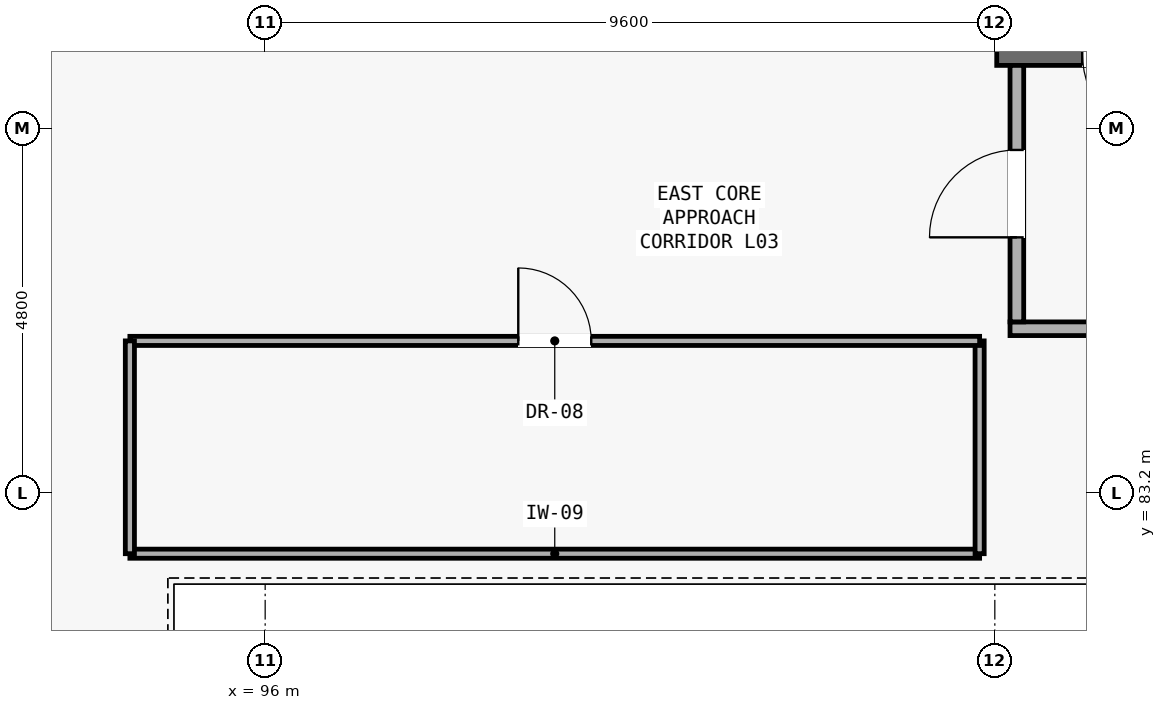
"""IFC4 building model, lengths in metres.
Left out: names, types, materials, properties, quantities, classifications, styles, units other than length and angle.
Written with IfcOpenShell. Run it as: python <this file> out.ifc"""

import sys

from ifc_helpers import new_model, si_unit, direction, frame, frame_2d, origin, place, context, subcontext, project, spatial, rectangle, extrude, element, fill, save


model = new_model("IFC4")
c1 = context("Model", 3, precision=1e-05, world=origin(), true_north=direction((0.0, 1.0)))
c2 = subcontext(c1, "Body", "Model", "MODEL_VIEW")
j1 = project(units=[si_unit("LENGTHUNIT", "METRE"), si_unit("PLANEANGLEUNIT", "RADIAN")], contexts=[c1])
p1 = place(None, origin())
s1 = spatial("IfcSite", under=j1, at=p1, CompositionType="ELEMENT")
p2 = place(p1, origin())
s2 = spatial("IfcBuilding", under=s1, at=p2, CompositionType="ELEMENT")
p3 = place(p2, frame((0.0, 0.0, 13.65)))
s3 = spatial("IfcBuildingStorey", under=s2, at=p3, CompositionType="ELEMENT", Elevation=13.65)
p4 = place(p3, frame((105.625, 89.0, 0.0), z_axis=(0.0, 0.0, 1.0), x_axis=(1.0, 0.0, 0.0)))
e1 = element("IfcWall", 1, at=p4, inside=s3, PredefinedType="SHEAR", context=c2, shape_type="SweptSolid", body=[
    extrude(rectangle(XDim=3.9, YDim=0.35, at=frame_2d((1.95, 0.0))), origin(), (0.0, 0.0, 1.0), 3.98),
])
p5 = place(p4, frame((1.125, 0.0, 0.0)))
e2 = element("IfcOpeningElement", 2, at=p5, cuts=e1, PredefinedType="OPENING", context=c2, shape_type="SweptSolid", body=[
    extrude(rectangle(XDim=1.3, YDim=2.15, at=frame_2d((0.65, 1.075))), frame((0.0, 0.185, 0.0), z_axis=(0.0, -1.0, 0.0), x_axis=(1.0, 0.0, 0.0)), (0.0, 0.0, 1.0), 0.37),
])
p6 = place(p3, frame((105.8, 85.36, 0.0), z_axis=(0.0, 0.0, 1.0), x_axis=(1.0, 0.0, 0.0)))
e3 = element("IfcWall", 3, at=p6, inside=s3, PredefinedType="PARTITIONING", context=c2, shape_type="SweptSolid", body=[
    extrude(rectangle(XDim=8.55, YDim=0.18, at=frame_2d((4.275, 0.0))), origin(), (0.0, 0.0, 1.0), 3.98),
])
p7 = place(p3, frame((105.89, 85.45, 0.0), z_axis=(0.0, 0.0, 1.0), x_axis=(0.0, 1.0, 0.0)))
e4 = element("IfcWall", 4, at=p7, inside=s3, PredefinedType="PARTITIONING", context=c2, shape_type="SweptSolid", body=[
    extrude(rectangle(XDim=3.375, YDim=0.18, at=frame_2d((1.688, 0.0))), origin(), (0.0, 0.0, 1.0), 3.98),
])
p8 = place(p7, frame((1.113, 0.0, 0.0)))
e5 = element("IfcOpeningElement", 5, at=p8, cuts=e4, PredefinedType="OPENING", context=c2, shape_type="SweptSolid", body=[
    extrude(rectangle(XDim=1.15, YDim=2.15, at=frame_2d((0.575, 1.075))), frame((0.0, 0.1, 0.0), z_axis=(0.0, -1.0, 0.0), x_axis=(1.0, 0.0, 0.0)), (0.0, 0.0, 1.0), 0.2),
])
p9 = place(p3, frame((94.22, 82.4, 0.0), z_axis=(0.0, 0.0, 1.0), x_axis=(1.0, 0.0, 0.0)))
e6 = element("IfcWall", 6, at=p9, inside=s3, PredefinedType="PARTITIONING", context=c2, shape_type="SweptSolid", body=[
    extrude(rectangle(XDim=11.18, YDim=0.12, at=frame_2d((5.59, 0.0))), origin(), (0.0, 0.0, 1.0), 3.98),
])
p10 = place(p3, frame((105.4, 82.4, 0.0), z_axis=(0.0, 0.0, 1.0), x_axis=(0.0, 1.0, 0.0)))
e7 = element("IfcWall", 7, at=p10, inside=s3, PredefinedType="PARTITIONING", context=c2, shape_type="SweptSolid", body=[
    extrude(rectangle(XDim=2.8, YDim=0.12, at=frame_2d((1.4, 0.0))), origin(), (0.0, 0.0, 1.0), 3.98),
])
p11 = place(p3, frame((105.4, 85.2, 0.0), z_axis=(0.0, 0.0, 1.0), x_axis=(-1.0, 0.0, 0.0)))
e8 = element("IfcWall", 8, at=p11, inside=s3, PredefinedType="PARTITIONING", context=c2, shape_type="SweptSolid", body=[
    extrude(rectangle(XDim=11.18, YDim=0.12, at=frame_2d((5.59, 0.0))), origin(), (0.0, 0.0, 1.0), 3.98),
])
p12 = place(p11, frame((5.11, 0.0, 0.0)))
e9 = element("IfcOpeningElement", 9, at=p12, cuts=e8, PredefinedType="OPENING", context=c2, shape_type="SweptSolid", body=[
    extrude(rectangle(XDim=0.96, YDim=2.08, at=frame_2d((0.48, 1.04))), frame((0.0, 0.07, 0.0), z_axis=(0.0, -1.0, 0.0), x_axis=(1.0, 0.0, 0.0)), (0.0, 0.0, 1.0), 0.14),
])
p13 = place(p3, frame((94.22, 85.2, 0.0), z_axis=(0.0, 0.0, 1.0), x_axis=(0.0, -1.0, 0.0)))
e10 = element("IfcWall", 10, at=p13, inside=s3, PredefinedType="PARTITIONING", context=c2, shape_type="SweptSolid", body=[
    extrude(rectangle(XDim=2.8, YDim=0.12, at=frame_2d((1.4, 0.0))), origin(), (0.0, 0.0, 1.0), 3.98),
])
p14 = place(p5, frame((1.3, 0.0, 0.0), z_axis=(0.0, 0.0, 1.0), x_axis=(-1.0, 0.0, 0.0)))
e11 = element("IfcDoor", 11, at=p14, inside=s3, OperationType="SINGLE_SWING_RIGHT", PredefinedType="DOOR", context=c2, shape_type="SweptSolid", body=[
    extrude(rectangle(XDim=1.3, YDim=2.15, at=frame_2d((0.65, 1.075))), frame((0.0, 0.025, 0.0), z_axis=(0.0, -1.0, 0.0), x_axis=(1.0, 0.0, 0.0)), (0.0, 0.0, 1.0), 0.05),
])
fill(e2, e11)
p15 = place(p8, origin())
e12 = element("IfcDoor", 12, at=p15, inside=s3, OperationType="SINGLE_SWING_LEFT", PredefinedType="DOOR", context=c2, shape_type="SweptSolid", body=[
    extrude(rectangle(XDim=1.15, YDim=2.15, at=frame_2d((0.575, 1.075))), frame((0.0, 0.025, 0.0), z_axis=(0.0, -1.0, 0.0), x_axis=(1.0, 0.0, 0.0)), (0.0, 0.0, 1.0), 0.05),
])
fill(e5, e12)
p16 = place(p12, frame((0.96, 0.0, 0.0), z_axis=(0.0, 0.0, 1.0), x_axis=(-1.0, 0.0, 0.0)))
e13 = element("IfcDoor", 13, at=p16, inside=s3, OperationType="SINGLE_SWING_RIGHT", PredefinedType="DOOR", context=c2, shape_type="SweptSolid", body=[
    extrude(rectangle(XDim=0.96, YDim=2.08, at=frame_2d((0.48, 1.04))), frame((0.0, 0.025, 0.0), z_axis=(0.0, -1.0, 0.0), x_axis=(1.0, 0.0, 0.0)), (0.0, 0.0, 1.0), 0.05),
])
fill(e9, e13)
save(model, sys.argv[1])
